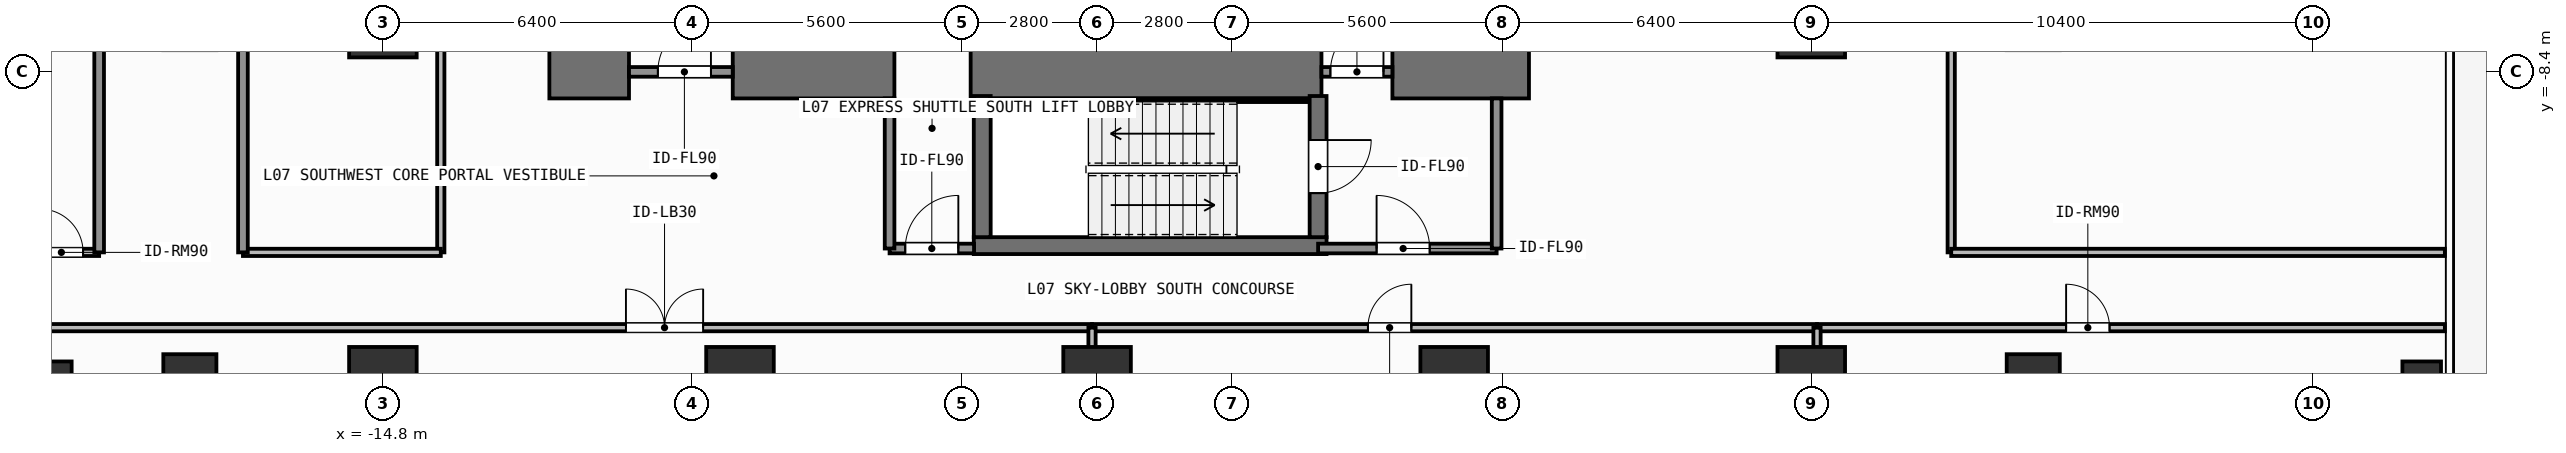
"""IFC4 building model, lengths in metres.
Left out: names, types, materials, properties, quantities, classifications, styles, units other than length and angle.
Written with IfcOpenShell. Run it as: python <this file> out.ifc"""

import sys

from ifc_helpers import new_model, si_unit, direction, frame, frame_2d, origin, origin_2d, place, context, subcontext, project, spatial, rectangle, hollow_rectangle, extrude, element, fill, save


model = new_model("IFC4")
c1 = context("Model", 3, precision=1e-05, world=origin(), true_north=direction((0.0, 1.0)))
c2 = subcontext(c1, "Body", "Model", "MODEL_VIEW")
j1 = project(units=[si_unit("LENGTHUNIT", "METRE"), si_unit("PLANEANGLEUNIT", "RADIAN")], contexts=[c1])
p1 = place(None, origin())
s1 = spatial("IfcSite", under=j1, at=p1, CompositionType="ELEMENT")
p2 = place(p1, origin())
s2 = spatial("IfcBuilding", under=s1, at=p2, CompositionType="ELEMENT")
p3 = place(p2, frame((0.0, 0.0, 26.4)))
s3 = spatial("IfcBuildingStorey", under=s2, at=p3, CompositionType="ELEMENT", Elevation=26.4)
p4 = place(p3, frame((-11.35, -8.4, 0.0), z_axis=(0.0, 0.0, 1.0), x_axis=(1.0, 0.0, 0.0)))
e1 = element("IfcWall", 1, at=p4, inside=s3, PredefinedType="SHEAR", context=c2, shape_type="SweptSolid", body=[
    extrude(rectangle(XDim=1.65, YDim=1.1, at=frame_2d((0.825, 0.0))), origin(), (0.0, 0.0, 1.0), 4.2),
])
p5 = place(p3, frame((-7.55, -8.4, 0.0), z_axis=(0.0, 0.0, 1.0), x_axis=(1.0, 0.0, 0.0)))
e2 = element("IfcWall", 2, at=p5, inside=s3, PredefinedType="SHEAR", context=c2, shape_type="SweptSolid", body=[
    extrude(rectangle(XDim=3.35, YDim=1.1, at=frame_2d((1.675, 0.0))), origin(), (0.0, 0.0, 1.0), 4.2),
])
p6 = place(p3, frame((-2.62, -8.4, 0.0), z_axis=(0.0, 0.0, 1.0), x_axis=(1.0, 0.0, 0.0)))
e3 = element("IfcWall", 3, at=p6, inside=s3, PredefinedType="SHEAR", context=c2, shape_type="SweptSolid", body=[
    extrude(rectangle(XDim=7.27, YDim=1.1, at=frame_2d((3.635, 0.0))), origin(), (0.0, 0.0, 1.0), 4.2),
])
p7 = place(p3, frame((6.12, -8.4, 0.0), z_axis=(0.0, 0.0, 1.0), x_axis=(1.0, 0.0, 0.0)))
e4 = element("IfcWall", 4, at=p7, inside=s3, PredefinedType="SHEAR", context=c2, shape_type="SweptSolid", body=[
    extrude(rectangle(XDim=2.83, YDim=1.1, at=frame_2d((1.415, 0.0))), origin(), (0.0, 0.0, 1.0), 4.2),
])
p8 = place(p3, frame((-2.555, -12.0, 0.0), z_axis=(0.0, 0.0, 1.0), x_axis=(1.0, 0.0, 0.0)))
e5 = element("IfcWall", 5, at=p8, inside=s3, PredefinedType="SHEAR", context=c2, shape_type="SweptSolid", body=[
    extrude(rectangle(XDim=7.31, YDim=0.35, at=frame_2d((3.655, 0.0))), origin(), (0.0, 0.0, 1.0), 4.2),
])
p9 = place(p3, frame((-2.2, -8.988, 0.0), z_axis=(0.0, 0.0, 1.0), x_axis=(1.0, 0.0, 0.0)))
e6 = element("IfcWall", 6, at=p9, inside=s3, PredefinedType="SHEAR", context=c2, shape_type="SweptSolid", body=[
    extrude(rectangle(XDim=6.6, YDim=0.075, at=frame_2d((3.3, 0.0))), origin(), (0.0, 0.0, 1.0), 4.2),
])
p10 = place(p3, frame((-2.38, -11.825, 0.0), z_axis=(0.0, 0.0, 1.0), x_axis=(0.0, 1.0, 0.0)))
e7 = element("IfcWall", 7, at=p10, inside=s3, PredefinedType="SHEAR", context=c2, shape_type="SweptSolid", body=[
    extrude(rectangle(XDim=2.925, YDim=0.35, at=frame_2d((1.462, 0.0))), origin(), (0.0, 0.0, 1.0), 4.2),
])
p11 = place(p3, frame((4.58, -8.9, 0.0), z_axis=(0.0, 0.0, 1.0), x_axis=(0.0, -1.0, 0.0)))
e8 = element("IfcWall", 8, at=p11, inside=s3, PredefinedType="SHEAR", context=c2, shape_type="SweptSolid", body=[
    extrude(rectangle(XDim=2.925, YDim=0.35, at=frame_2d((1.462, 0.0))), origin(), (0.0, 0.0, 1.0), 4.2),
])
p12 = place(p11, frame((0.913, 0.0, 0.0)))
e9 = element("IfcOpeningElement", 9, at=p12, cuts=e8, PredefinedType="OPENING", context=c2, shape_type="SweptSolid", body=[
    extrude(rectangle(XDim=1.1, YDim=2.15, at=frame_2d((0.55, 1.075))), frame((0.0, 0.185, 0.0), z_axis=(0.0, -1.0, 0.0), x_axis=(1.0, 0.0, 0.0)), (0.0, 0.0, 1.0), 0.37),
])
for number, where, z_axis, x_axis in (
    (10, (-14.8, -14.8, 0.0), (0.0, 0.0, 1.0), (1.0, 0.0, 0.0)),
    (11, (-7.4, -14.8, 0.0), (0.0, 0.0, 1.0), (1.0, 0.0, 0.0)),
    (12, (0.0, -14.8, 0.0), (0.0, 0.0, 1.0), (1.0, 0.0, 0.0)),
    (13, (7.4, -14.8, 0.0), (0.0, 0.0, 1.0), (1.0, 0.0, 0.0)),
    (14, (14.8, -14.8, 0.0), (0.0, 0.0, 1.0), (1.0, 0.0, 0.0)),
    (15, (-14.8, -7.4, 0.0), (0.0, 0.0, 1.0), (1.0, 0.0, 0.0)),
    (16, (14.8, -7.4, 0.0), (0.0, 0.0, 1.0), (1.0, 0.0, 0.0)),
):
    element("IfcColumn", number, at=place(p3, frame(where, z_axis=z_axis, x_axis=x_axis)), inside=s3, PredefinedType="COLUMN", context=c2, shape_type="SweptSolid", body=[
        extrude(rectangle(XDim=1.4, YDim=1.4, at=origin_2d()), origin(), (0.0, 0.0, 1.0), 4.2),
    ])
for number, where, z_axis, x_axis in (
    (17, (-18.8, -14.8, 0.0), (0.0, 0.0, 1.0), (1.0, 0.0, 0.0)),
    (18, (19.4, -14.8, 0.0), (0.0, 0.0, 1.0), (1.0, 0.0, 0.0)),
):
    element("IfcColumn", number, at=place(p3, frame(where, z_axis=z_axis, x_axis=x_axis)), inside=s3, PredefinedType="COLUMN", context=c2, shape_type="SweptSolid", body=[
        extrude(rectangle(XDim=1.1, YDim=1.1, at=origin_2d()), origin(), (0.0, 0.0, 1.0), 4.2),
    ])
for number, where, z_axis, x_axis in (
    (19, (-21.65, -14.8, 0.0), (0.0, 0.0, 1.0), (1.0, 0.0, 0.0)),
    (20, (27.45, -14.8, 0.0), (0.0, 0.0, 1.0), (1.0, 0.0, 0.0)),
):
    element("IfcColumn", number, at=place(p3, frame(where, z_axis=z_axis, x_axis=x_axis)), inside=s3, PredefinedType="COLUMN", context=c2, shape_type="SweptSolid", body=[
        extrude(hollow_rectangle(XDim=0.8, YDim=0.8, WallThickness=0.036, at=origin_2d()), origin(), (0.0, 0.0, 1.0), 4.2),
    ])
p13 = place(p3, frame((4.58, -12.06, 0.0), z_axis=(0.0, 0.0, 1.0), x_axis=(1.0, 0.0, 0.0)))
e21 = element("IfcWall", 21, at=p13, inside=s3, PredefinedType="SOLIDWALL", context=c2, shape_type="SweptSolid", body=[
    extrude(rectangle(XDim=3.7, YDim=0.2, at=frame_2d((1.85, 0.0))), origin(), (0.0, 0.0, 1.0), 3.98),
])
p14 = place(p13, frame((1.212, 0.0, 0.0)))
e22 = element("IfcOpeningElement", 22, at=p14, cuts=e21, PredefinedType="OPENING", context=c2, shape_type="SweptSolid", body=[
    extrude(rectangle(XDim=1.1, YDim=2.15, at=frame_2d((0.55, 1.075))), frame((0.0, 0.11, 0.0), z_axis=(0.0, -1.0, 0.0), x_axis=(1.0, 0.0, 0.0)), (0.0, 0.0, 1.0), 0.22),
])
p15 = place(p3, frame((4.65, -8.4, 0.0), z_axis=(0.0, 0.0, 1.0), x_axis=(1.0, 0.0, 0.0)))
e23 = element("IfcWall", 23, at=p15, inside=s3, PredefinedType="SOLIDWALL", context=c2, shape_type="SweptSolid", body=[
    extrude(rectangle(XDim=1.47, YDim=0.2, at=frame_2d((0.735, 0.0))), origin(), (0.0, 0.0, 1.0), 3.02),
])
p16 = place(p15, frame((0.185, 0.0, 0.0)))
e24 = element("IfcOpeningElement", 24, at=p16, cuts=e23, PredefinedType="OPENING", context=c2, shape_type="SweptSolid", body=[
    extrude(rectangle(XDim=1.1, YDim=2.15, at=frame_2d((0.55, 1.075))), frame((0.0, 0.11, 0.0), z_axis=(0.0, -1.0, 0.0), x_axis=(1.0, 0.0, 0.0)), (0.0, 0.0, 1.0), 0.22),
])
p17 = place(p3, frame((-9.7, -8.4, 0.0), z_axis=(0.0, 0.0, 1.0), x_axis=(1.0, 0.0, 0.0)))
e25 = element("IfcWall", 25, at=p17, inside=s3, PredefinedType="SOLIDWALL", context=c2, shape_type="SweptSolid", body=[
    extrude(rectangle(XDim=2.15, YDim=0.2, at=frame_2d((1.075, 0.0))), origin(), (0.0, 0.0, 1.0), 3.02),
])
p18 = place(p17, frame((0.598, 0.0, 0.0)))
e26 = element("IfcOpeningElement", 26, at=p18, cuts=e25, PredefinedType="OPENING", context=c2, shape_type="SweptSolid", body=[
    extrude(rectangle(XDim=1.1, YDim=2.15, at=frame_2d((0.55, 1.075))), frame((0.0, 0.11, 0.0), z_axis=(0.0, -1.0, 0.0), x_axis=(1.0, 0.0, 0.0)), (0.0, 0.0, 1.0), 0.22),
])
p19 = place(p3, frame((-4.3, -12.06, 0.0), z_axis=(0.0, 0.0, 1.0), x_axis=(1.0, 0.0, 0.0)))
e27 = element("IfcWall", 27, at=p19, inside=s3, PredefinedType="SOLIDWALL", context=c2, shape_type="SweptSolid", body=[
    extrude(rectangle(XDim=1.75, YDim=0.2, at=frame_2d((0.875, 0.0))), origin(), (0.0, 0.0, 1.0), 3.98),
])
p20 = place(p19, frame((0.325, 0.0, 0.0)))
e28 = element("IfcOpeningElement", 28, at=p20, cuts=e27, PredefinedType="OPENING", context=c2, shape_type="SweptSolid", body=[
    extrude(rectangle(XDim=1.1, YDim=2.15, at=frame_2d((0.55, 1.075))), frame((0.0, 0.11, 0.0), z_axis=(0.0, -1.0, 0.0), x_axis=(1.0, 0.0, 0.0)), (0.0, 0.0, 1.0), 0.22),
])
p21 = place(p3, frame((-22.13, -13.7, 0.0), z_axis=(0.0, 0.0, 1.0), x_axis=(1.0, 0.0, 0.0)))
e29 = element("IfcWall", 29, at=p21, inside=s3, PredefinedType="PARTITIONING", context=c2, shape_type="SweptSolid", body=[
    extrude(rectangle(XDim=22.025, YDim=0.15, at=frame_2d((11.012, 0.0))), origin(), (0.0, 0.0, 1.0), 3.98),
])
p22 = place(p21, frame((12.367, 0.0, 0.0)))
e30 = element("IfcOpeningElement", 30, at=p22, cuts=e29, PredefinedType="OPENING", context=c2, shape_type="SweptSolid", body=[
    extrude(rectangle(XDim=1.6, YDim=2.3, at=frame_2d((0.8, 1.15))), frame((0.0, 0.085, 0.0), z_axis=(0.0, -1.0, 0.0), x_axis=(1.0, 0.0, 0.0)), (0.0, 0.0, 1.0), 0.17),
])
p23 = place(p3, frame((-0.105, -13.7, 0.0), z_axis=(0.0, 0.0, 1.0), x_axis=(1.0, 0.0, 0.0)))
e31 = element("IfcWall", 31, at=p23, inside=s3, PredefinedType="PARTITIONING", context=c2, shape_type="SweptSolid", body=[
    extrude(rectangle(XDim=15.024, YDim=0.15, at=frame_2d((7.512, 0.0))), origin(), (0.0, 0.0, 1.0), 3.98),
])
p24 = place(p23, frame((5.718, 0.0, 0.0)))
e32 = element("IfcOpeningElement", 32, at=p24, cuts=e31, PredefinedType="OPENING", context=c2, shape_type="SweptSolid", body=[
    extrude(rectangle(XDim=0.9, YDim=2.1, at=frame_2d((0.45, 1.05))), frame((0.0, 0.085, 0.0), z_axis=(0.0, -1.0, 0.0), x_axis=(1.0, 0.0, 0.0)), (0.0, 0.0, 1.0), 0.17),
])
p25 = place(p3, frame((14.919, -13.7, 0.0), z_axis=(0.0, 0.0, 1.0), x_axis=(1.0, 0.0, 0.0)))
e33 = element("IfcWall", 33, at=p25, inside=s3, PredefinedType="PARTITIONING", context=c2, shape_type="SweptSolid", body=[
    extrude(rectangle(XDim=13.011, YDim=0.15, at=frame_2d((6.505, 0.0))), origin(), (0.0, 0.0, 1.0), 3.98),
])
p26 = place(p25, frame((5.162, 0.0, 0.0)))
e34 = element("IfcOpeningElement", 34, at=p26, cuts=e33, PredefinedType="OPENING", context=c2, shape_type="SweptSolid", body=[
    extrude(rectangle(XDim=0.9, YDim=2.1, at=frame_2d((0.45, 1.05))), frame((0.0, 0.085, 0.0), z_axis=(0.0, -1.0, 0.0), x_axis=(1.0, 0.0, 0.0)), (0.0, 0.0, 1.0), 0.17),
])
p27 = place(p3, frame((-13.6, -12.14, 0.0), z_axis=(0.0, 0.0, 1.0), x_axis=(0.0, 1.0, 0.0)))
e35 = element("IfcWall", 35, at=p27, inside=s3, PredefinedType="PARTITIONING", context=c2, shape_type="SweptSolid", body=[
    extrude(rectangle(XDim=24.28, YDim=0.15, at=frame_2d((12.14, 0.0))), origin(), (0.0, 0.0, 1.0), 3.98),
])
p28 = place(p27, frame((11.25, 0.0, 0.0)))
e36 = element("IfcOpeningElement", 36, at=p28, cuts=e35, PredefinedType="OPENING", context=c2, shape_type="SweptSolid", body=[
    extrude(rectangle(XDim=1.6, YDim=2.3, at=frame_2d((0.8, 1.15))), frame((0.0, 0.085, 0.0), z_axis=(0.0, -1.0, 0.0), x_axis=(1.0, 0.0, 0.0)), (0.0, 0.0, 1.0), 0.17),
])
p29 = place(p3, frame((-22.13, -12.14, 0.0), z_axis=(0.0, 0.0, 1.0), x_axis=(1.0, 0.0, 0.0)))
e37 = element("IfcWall", 37, at=p29, inside=s3, PredefinedType="PARTITIONING", context=c2, shape_type="SweptSolid", body=[
    extrude(rectangle(XDim=1.45, YDim=0.15, at=frame_2d((0.725, 0.0))), origin(), (0.0, 0.0, 1.0), 3.98),
])
p30 = place(p29, frame((0.218, 0.0, 0.0)))
e38 = element("IfcOpeningElement", 38, at=p30, cuts=e37, PredefinedType="OPENING", context=c2, shape_type="SweptSolid", body=[
    extrude(rectangle(XDim=0.9, YDim=2.1, at=frame_2d((0.45, 1.05))), frame((0.0, 0.085, 0.0), z_axis=(0.0, -1.0, 0.0), x_axis=(1.0, 0.0, 0.0)), (0.0, 0.0, 1.0), 0.17),
])
p31 = place(p3, frame((17.7, -12.14, 0.0), z_axis=(0.0, 0.0, 1.0), x_axis=(0.0, 1.0, 0.0)))
e39 = element("IfcWall", 39, at=p31, inside=s3, PredefinedType="PARTITIONING", context=c2, shape_type="SweptSolid", body=[
    extrude(rectangle(XDim=24.28, YDim=0.15, at=frame_2d((12.14, 0.0))), origin(), (0.0, 0.0, 1.0), 3.98),
])
p32 = place(p31, frame((11.25, 0.0, 0.0)))
e40 = element("IfcOpeningElement", 40, at=p32, cuts=e39, PredefinedType="OPENING", context=c2, shape_type="SweptSolid", body=[
    extrude(rectangle(XDim=1.6, YDim=2.3, at=frame_2d((0.8, 1.15))), frame((0.0, 0.085, 0.0), z_axis=(0.0, -1.0, 0.0), x_axis=(1.0, 0.0, 0.0)), (0.0, 0.0, 1.0), 0.17),
])
for number, where, z_axis, x_axis in (
    (41, (8.28, -12.06, 0.0), (0.0, 0.0, 1.0), (0.0, 1.0, 0.0)),
    (42, (-4.3, -12.06, 0.0), (0.0, 0.0, 1.0), (0.0, 1.0, 0.0)),
):
    element("IfcWall", number, at=place(p3, frame(where, z_axis=z_axis, x_axis=x_axis)), inside=s3, PredefinedType="SOLIDWALL", context=c2, shape_type="SweptSolid", body=[
        extrude(rectangle(XDim=3.11, YDim=0.2, at=frame_2d((1.555, 0.0))), origin(), (0.0, 0.0, 1.0), 3.98),
    ])
p33 = place(p3, frame((-0.105, -25.03, 0.0), z_axis=(0.0, 0.0, 1.0), x_axis=(0.0, 1.0, 0.0)))
e43 = element("IfcWall", 43, at=p33, inside=s3, PredefinedType="PARTITIONING", context=c2, shape_type="SweptSolid", body=[
    extrude(rectangle(XDim=11.33, YDim=0.15, at=frame_2d((5.665, 0.0))), origin(), (0.0, 0.0, 1.0), 3.98),
])
p34 = place(p3, frame((14.919, -25.03, 0.0), z_axis=(0.0, 0.0, 1.0), x_axis=(0.0, 1.0, 0.0)))
e44 = element("IfcWall", 44, at=p34, inside=s3, PredefinedType="PARTITIONING", context=c2, shape_type="SweptSolid", body=[
    extrude(rectangle(XDim=11.33, YDim=0.15, at=frame_2d((5.665, 0.0))), origin(), (0.0, 0.0, 1.0), 3.382),
])
p35 = place(p3, frame((-17.7, -12.14, 0.0), z_axis=(0.0, 0.0, 1.0), x_axis=(1.0, 0.0, 0.0)))
e45 = element("IfcWall", 45, at=p35, inside=s3, PredefinedType="PARTITIONING", context=c2, shape_type="SweptSolid", body=[
    extrude(rectangle(XDim=4.1, YDim=0.15, at=frame_2d((2.05, 0.0))), origin(), (0.0, 0.0, 1.0), 3.98),
])
for number, where, z_axis, x_axis in (
    (46, (-17.7, -12.14, 0.0), (0.0, 0.0, 1.0), (0.0, 1.0, 0.0)),
    (47, (-20.68, -12.14, 0.0), (0.0, 0.0, 1.0), (0.0, 1.0, 0.0)),
):
    element("IfcWall", number, at=place(p3, frame(where, z_axis=z_axis, x_axis=x_axis)), inside=s3, PredefinedType="SOLIDWALL", context=c2, shape_type="SweptSolid", body=[
        extrude(rectangle(XDim=24.28, YDim=0.2, at=frame_2d((12.14, 0.0))), origin(), (0.0, 0.0, 1.0), 3.98),
    ])
p36 = place(p3, frame((17.7, -12.14, 0.0), z_axis=(0.0, 0.0, 1.0), x_axis=(1.0, 0.0, 0.0)))
e48 = element("IfcWall", 48, at=p36, inside=s3, PredefinedType="PARTITIONING", context=c2, shape_type="SweptSolid", body=[
    extrude(rectangle(XDim=10.23, YDim=0.15, at=frame_2d((5.115, 0.0))), origin(), (0.0, 0.0, 1.0), 3.98),
])
p37 = place(p12, origin())
e49 = element("IfcDoor", 49, at=p37, inside=s3, OperationType="SINGLE_SWING_LEFT", PredefinedType="DOOR", context=c2, shape_type="SweptSolid", body=[
    extrude(rectangle(XDim=1.1, YDim=2.15, at=frame_2d((0.55, 1.075))), frame((0.0, 0.025, 0.0), z_axis=(0.0, -1.0, 0.0), x_axis=(1.0, 0.0, 0.0)), (0.0, 0.0, 1.0), 0.05),
])
fill(e9, e49)
p38 = place(p14, origin())
e50 = element("IfcDoor", 50, at=p38, inside=s3, OperationType="SINGLE_SWING_LEFT", PredefinedType="DOOR", context=c2, shape_type="SweptSolid", body=[
    extrude(rectangle(XDim=1.1, YDim=2.15, at=frame_2d((0.55, 1.075))), frame((0.0, 0.025, 0.0), z_axis=(0.0, -1.0, 0.0), x_axis=(1.0, 0.0, 0.0)), (0.0, 0.0, 1.0), 0.05),
])
fill(e22, e50)
p39 = place(p16, origin())
e51 = element("IfcDoor", 51, at=p39, inside=s3, OperationType="SINGLE_SWING_RIGHT", PredefinedType="DOOR", context=c2, shape_type="SweptSolid", body=[
    extrude(rectangle(XDim=1.1, YDim=2.15, at=frame_2d((0.55, 1.075))), frame((0.0, 0.025, 0.0), z_axis=(0.0, -1.0, 0.0), x_axis=(1.0, 0.0, 0.0)), (0.0, 0.0, 1.0), 0.05),
])
fill(e24, e51)
p40 = place(p18, origin())
e52 = element("IfcDoor", 52, at=p40, inside=s3, OperationType="SINGLE_SWING_RIGHT", PredefinedType="DOOR", context=c2, shape_type="SweptSolid", body=[
    extrude(rectangle(XDim=1.1, YDim=2.15, at=frame_2d((0.55, 1.075))), frame((0.0, 0.025, 0.0), z_axis=(0.0, -1.0, 0.0), x_axis=(1.0, 0.0, 0.0)), (0.0, 0.0, 1.0), 0.05),
])
fill(e26, e52)
p41 = place(p20, origin())
e53 = element("IfcDoor", 53, at=p41, inside=s3, OperationType="SINGLE_SWING_RIGHT", PredefinedType="DOOR", context=c2, shape_type="SweptSolid", body=[
    extrude(rectangle(XDim=1.1, YDim=2.15, at=frame_2d((0.55, 1.075))), frame((0.0, 0.025, 0.0), z_axis=(0.0, -1.0, 0.0), x_axis=(1.0, 0.0, 0.0)), (0.0, 0.0, 1.0), 0.05),
])
fill(e28, e53)
p42 = place(p22, origin())
e54 = element("IfcDoor", 54, at=p42, inside=s3, OperationType="SINGLE_SWING_LEFT", PredefinedType="DOOR", context=c2, shape_type="SweptSolid", body=[
    extrude(rectangle(XDim=1.6, YDim=2.3, at=frame_2d((0.8, 1.15))), frame((0.0, 0.025, 0.0), z_axis=(0.0, -1.0, 0.0), x_axis=(1.0, 0.0, 0.0)), (0.0, 0.0, 1.0), 0.05),
])
fill(e30, e54)
p43 = place(p24, origin())
e55 = element("IfcDoor", 55, at=p43, inside=s3, OperationType="SINGLE_SWING_RIGHT", PredefinedType="DOOR", context=c2, shape_type="SweptSolid", body=[
    extrude(rectangle(XDim=0.9, YDim=2.1, at=frame_2d((0.45, 1.05))), frame((0.0, 0.025, 0.0), z_axis=(0.0, -1.0, 0.0), x_axis=(1.0, 0.0, 0.0)), (0.0, 0.0, 1.0), 0.05),
])
fill(e32, e55)
p44 = place(p26, origin())
e56 = element("IfcDoor", 56, at=p44, inside=s3, OperationType="SINGLE_SWING_LEFT", PredefinedType="DOOR", context=c2, shape_type="SweptSolid", body=[
    extrude(rectangle(XDim=0.9, YDim=2.1, at=frame_2d((0.45, 1.05))), frame((0.0, 0.025, 0.0), z_axis=(0.0, -1.0, 0.0), x_axis=(1.0, 0.0, 0.0)), (0.0, 0.0, 1.0), 0.05),
])
fill(e34, e56)
p45 = place(p30, origin())
e57 = element("IfcDoor", 57, at=p45, inside=s3, OperationType="SINGLE_SWING_LEFT", PredefinedType="DOOR", context=c2, shape_type="SweptSolid", body=[
    extrude(rectangle(XDim=0.9, YDim=2.1, at=frame_2d((0.45, 1.05))), frame((0.0, 0.025, 0.0), z_axis=(0.0, -1.0, 0.0), x_axis=(1.0, 0.0, 0.0)), (0.0, 0.0, 1.0), 0.05),
])
fill(e38, e57)
save(model, sys.argv[1])
